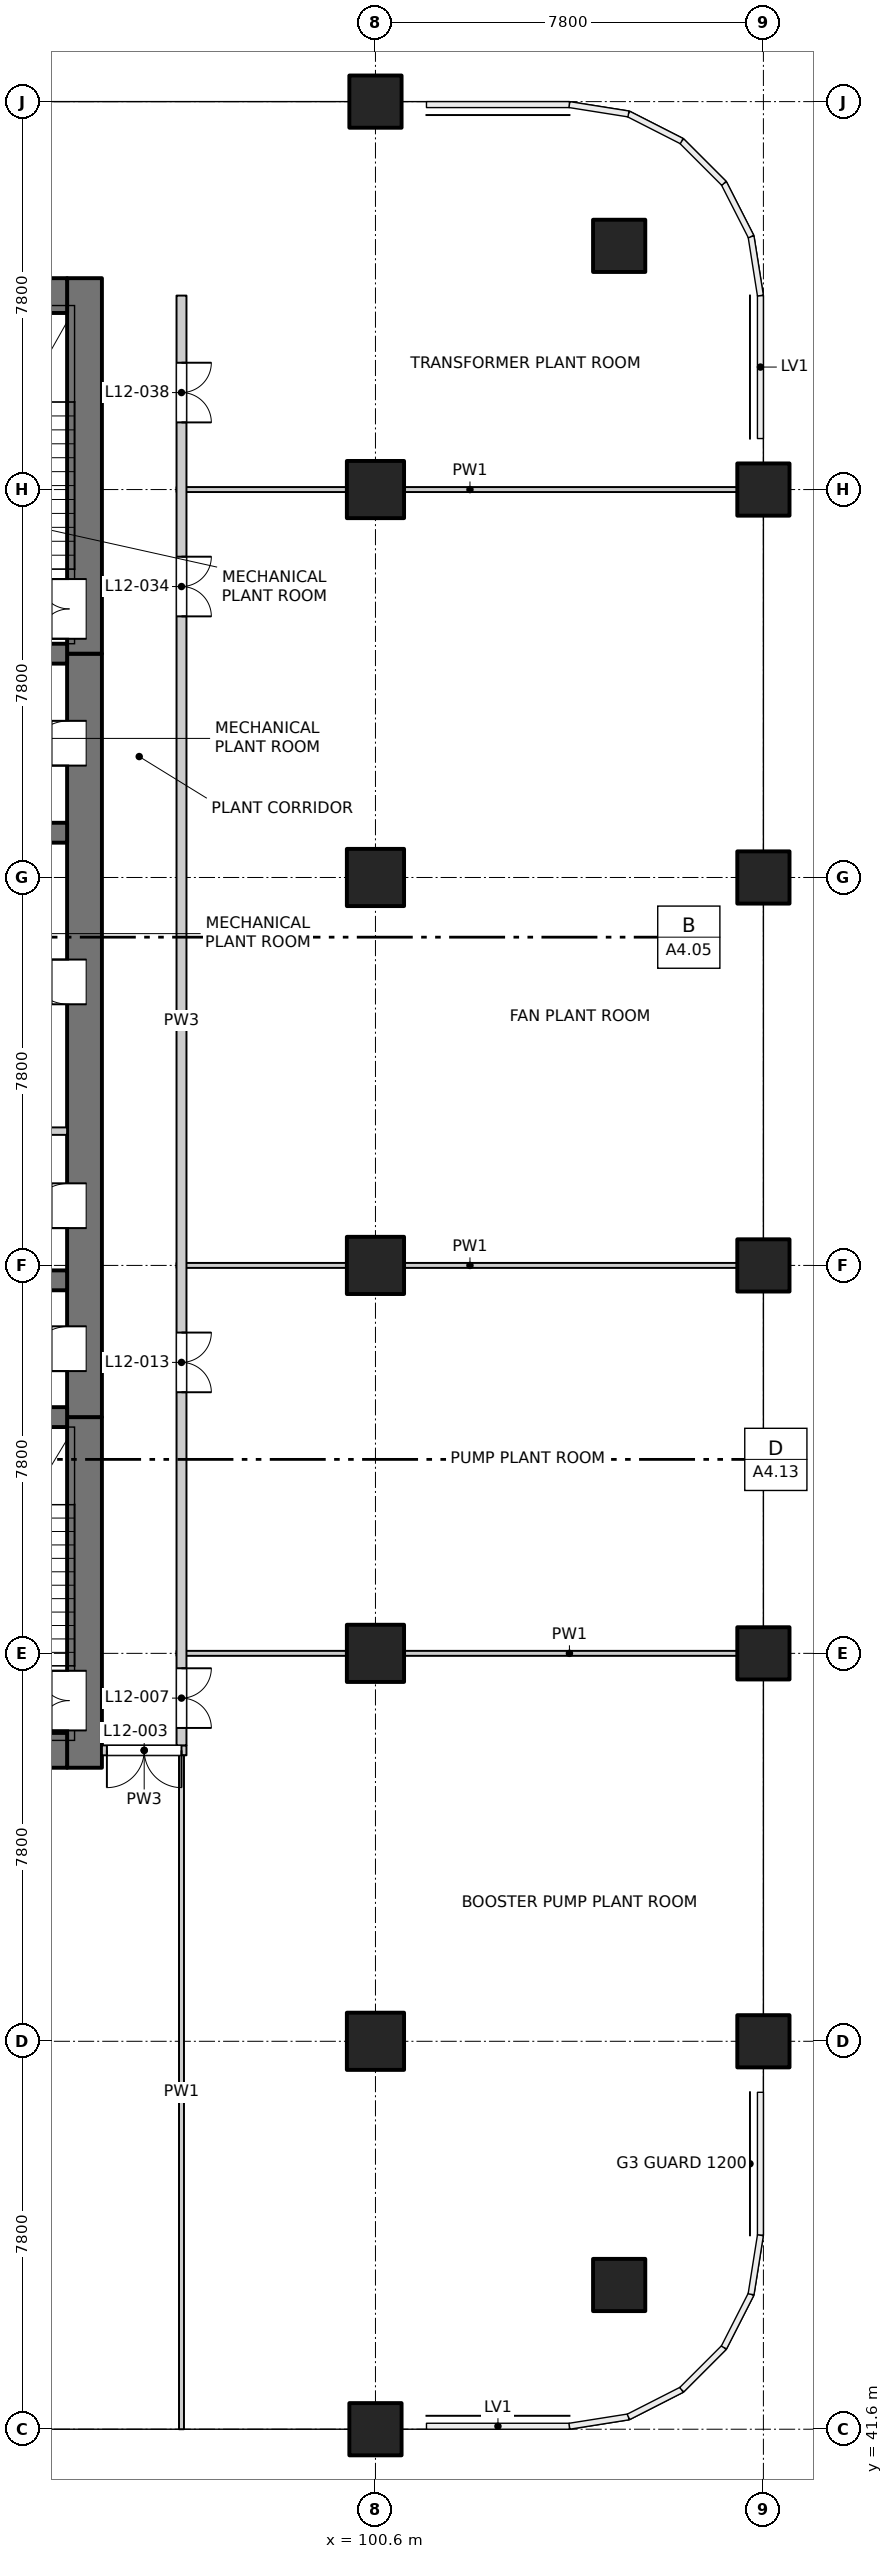
"""IFC4 building model, lengths in metres.
Left out: names, types, materials, properties, quantities, classifications, styles, units other than length and angle.
Written with IfcOpenShell. Run it as: python <this file> out.ifc"""

import sys

from ifc_helpers import new_model, si_unit, direction, frame, frame_2d, origin, origin_2d, place, context, subcontext, project, spatial, rectangle, extrude, element, fill, save


model = new_model("IFC4")
c1 = context("Model", 3, precision=1e-05, world=origin(), true_north=direction((0.0, 1.0)))
c2 = subcontext(c1, "Body", "Model", "MODEL_VIEW")
j1 = project(units=[si_unit("LENGTHUNIT", "METRE"), si_unit("PLANEANGLEUNIT", "RADIAN")], contexts=[c1])
p1 = place(None, origin())
s1 = spatial("IfcSite", under=j1, at=p1, CompositionType="ELEMENT")
p2 = place(p1, origin())
s2 = spatial("IfcBuilding", under=s1, at=p2, CompositionType="ELEMENT")
p3 = place(p2, frame((0.0, 0.0, 46.7)))
s3 = spatial("IfcBuildingStorey", under=s2, at=p3, CompositionType="ELEMENT", Elevation=46.7)
for number, where, z_axis, x_axis in (
    (1, (105.5, 44.5, -0.3), (0.0, 0.0, 1.0), (1.0, 0.0, 0.0)),
    (2, (105.5, 85.5, -0.3), (0.0, 0.0, 1.0), (1.0, 0.0, 0.0)),
    (3, (108.4, 49.4, -0.3), (0.0, 0.0, 1.0), (1.0, 0.0, 0.0)),
    (4, (108.4, 57.2, -0.3), (0.0, 0.0, 1.0), (1.0, 0.0, 0.0)),
    (5, (108.4, 65.0, -0.3), (0.0, 0.0, 1.0), (1.0, 0.0, 0.0)),
    (6, (108.4, 72.8, -0.3), (0.0, 0.0, 1.0), (1.0, 0.0, 0.0)),
    (7, (108.4, 80.6, -0.3), (0.0, 0.0, 1.0), (1.0, 0.0, 0.0)),
    (8, (100.6, 41.6, -0.3), (0.0, 0.0, 1.0), (1.0, 0.0, 0.0)),
    (9, (100.6, 88.4, -0.3), (0.0, 0.0, 1.0), (1.0, 0.0, 0.0)),
):
    element("IfcColumn", number, at=place(p3, frame(where, z_axis=z_axis, x_axis=x_axis)), inside=s3, PredefinedType="COLUMN", context=c2, shape_type="SweptSolid", body=[
        extrude(rectangle(XDim=1.05, YDim=1.05, at=origin_2d()), origin(), (0.0, 0.0, 1.0), 4.5),
    ])
for number, where, z_axis, x_axis in (
    (10, (100.6, 49.4, -0.3), (0.0, 0.0, 1.0), (1.0, 0.0, 0.0)),
    (11, (100.6, 57.2, -0.3), (0.0, 0.0, 1.0), (1.0, 0.0, 0.0)),
    (12, (100.6, 65.0, -0.3), (0.0, 0.0, 1.0), (1.0, 0.0, 0.0)),
    (13, (100.6, 72.8, -0.3), (0.0, 0.0, 1.0), (1.0, 0.0, 0.0)),
    (14, (100.6, 80.6, -0.3), (0.0, 0.0, 1.0), (1.0, 0.0, 0.0)),
):
    element("IfcColumn", number, at=place(p3, frame(where, z_axis=z_axis, x_axis=x_axis)), inside=s3, PredefinedType="COLUMN", context=c2, shape_type="SweptSolid", body=[
        extrude(rectangle(XDim=1.15, YDim=1.15, at=origin_2d()), origin(), (0.0, 0.0, 1.0), 4.5),
    ])
p4 = place(p3, frame((94.75, 54.9, -0.3), z_axis=(0.0, 0.0, 1.0), x_axis=(0.0, 1.0, 0.0)))
e15 = element("IfcWall", 15, at=p4, inside=s3, PredefinedType="SOLIDWALL", context=c2, shape_type="SweptSolid", body=[
    extrude(rectangle(XDim=7.05, YDim=0.7, at=frame_2d((3.525, 0.0))), origin(), (0.0, 0.0, 1.0), 4.5),
])
p5 = place(p4, frame((0.75, 0.0, 0.3)))
e16 = element("IfcOpeningElement", 16, at=p5, cuts=e15, PredefinedType="OPENING", context=c2, shape_type="SweptSolid", body=[
    extrude(rectangle(XDim=1.2, YDim=2.1, at=frame_2d((0.6, 1.05))), frame((0.0, 0.36, 0.0), z_axis=(0.0, -1.0, 0.0), x_axis=(1.0, 0.0, 0.0)), (0.0, 0.0, 1.0), 0.72),
])
p6 = place(p3, frame((94.75, 61.95, -0.3), z_axis=(0.0, 0.0, 1.0), x_axis=(0.0, 1.0, 0.0)))
e17 = element("IfcWall", 17, at=p6, inside=s3, PredefinedType="SOLIDWALL", context=c2, shape_type="SweptSolid", body=[
    extrude(rectangle(XDim=15.35, YDim=0.7, at=frame_2d((7.675, 0.0))), origin(), (0.0, 0.0, 1.0), 4.5),
])
p7 = place(p6, frame((0.925, 0.0, 0.3)))
e18 = element("IfcOpeningElement", 18, at=p7, cuts=e17, PredefinedType="OPENING", context=c2, shape_type="SweptSolid", body=[
    extrude(rectangle(XDim=0.9, YDim=2.1, at=frame_2d((0.45, 1.05))), frame((0.0, 0.36, 0.0), z_axis=(0.0, -1.0, 0.0), x_axis=(1.0, 0.0, 0.0)), (0.0, 0.0, 1.0), 0.72),
])
p8 = place(p6, frame((3.8, 0.0, 0.3)))
e19 = element("IfcOpeningElement", 19, at=p8, cuts=e17, PredefinedType="OPENING", context=c2, shape_type="SweptSolid", body=[
    extrude(rectangle(XDim=0.9, YDim=2.1, at=frame_2d((0.45, 1.05))), frame((0.0, 0.36, 0.0), z_axis=(0.0, -1.0, 0.0), x_axis=(1.0, 0.0, 0.0)), (0.0, 0.0, 1.0), 0.72),
])
p9 = place(p6, frame((8.3, 0.0, 0.3)))
e20 = element("IfcOpeningElement", 20, at=p9, cuts=e17, PredefinedType="OPENING", context=c2, shape_type="SweptSolid", body=[
    extrude(rectangle(XDim=0.9, YDim=2.1, at=frame_2d((0.45, 1.05))), frame((0.0, 0.36, 0.0), z_axis=(0.0, -1.0, 0.0), x_axis=(1.0, 0.0, 0.0)), (0.0, 0.0, 1.0), 0.72),
])
p10 = place(p6, frame((13.1, 0.0, 0.3)))
e21 = element("IfcOpeningElement", 21, at=p10, cuts=e17, PredefinedType="OPENING", context=c2, shape_type="SweptSolid", body=[
    extrude(rectangle(XDim=0.9, YDim=2.1, at=frame_2d((0.45, 1.05))), frame((0.0, 0.36, 0.0), z_axis=(0.0, -1.0, 0.0), x_axis=(1.0, 0.0, 0.0)), (0.0, 0.0, 1.0), 0.72),
])
p11 = place(p3, frame((94.75, 77.3, -0.3), z_axis=(0.0, 0.0, 1.0), x_axis=(0.0, 1.0, 0.0)))
e22 = element("IfcWall", 22, at=p11, inside=s3, PredefinedType="SOLIDWALL", context=c2, shape_type="SweptSolid", body=[
    extrude(rectangle(XDim=7.55, YDim=0.7, at=frame_2d((3.775, 0.0))), origin(), (0.0, 0.0, 1.0), 4.5),
])
p12 = place(p11, frame((0.3, 0.0, 0.3)))
e23 = element("IfcOpeningElement", 23, at=p12, cuts=e22, PredefinedType="OPENING", context=c2, shape_type="SweptSolid", body=[
    extrude(rectangle(XDim=1.2, YDim=2.1, at=frame_2d((0.6, 1.05))), frame((0.0, 0.36, 0.0), z_axis=(0.0, -1.0, 0.0), x_axis=(1.0, 0.0, 0.0)), (0.0, 0.0, 1.0), 0.72),
])
p13 = place(p3, frame((75.6, 55.25, -0.3), z_axis=(0.0, 0.0, 1.0), x_axis=(1.0, 0.0, 0.0)))
e24 = element("IfcWall", 24, at=p13, inside=s3, PredefinedType="SOLIDWALL", context=c2, shape_type="SweptSolid", body=[
    extrude(rectangle(XDim=18.8, YDim=0.7, at=frame_2d((9.4, 0.0))), origin(), (0.0, 0.0, 1.0), 4.5),
])
p14 = place(p13, frame((7.15, 0.0, 0.3)))
e25 = element("IfcOpeningElement", 25, at=p14, cuts=e24, PredefinedType="OPENING", context=c2, shape_type="SweptSolid", body=[
    extrude(rectangle(XDim=1.5, YDim=2.1, at=frame_2d((0.75, 1.05))), frame((0.0, 0.36, 0.0), z_axis=(0.0, -1.0, 0.0), x_axis=(1.0, 0.0, 0.0)), (0.0, 0.0, 1.0), 0.72),
])
p15 = place(p3, frame((75.6, 84.5, -0.3), z_axis=(0.0, 0.0, 1.0), x_axis=(1.0, 0.0, 0.0)))
e26 = element("IfcWall", 26, at=p15, inside=s3, PredefinedType="SOLIDWALL", context=c2, shape_type="SweptSolid", body=[
    extrude(rectangle(XDim=18.8, YDim=0.7, at=frame_2d((9.4, 0.0))), origin(), (0.0, 0.0, 1.0), 4.5),
])
for number, where, z_axis, x_axis in (
    (27, (90.75, 61.95, -0.3), (0.0, 0.0, 1.0), (1.0, 0.0, 0.0)),
    (28, (90.75, 64.7, -0.3), (0.0, 0.0, 1.0), (1.0, 0.0, 0.0)),
    (29, (90.75, 73.7, -0.3), (0.0, 0.0, 1.0), (1.0, 0.0, 0.0)),
    (30, (90.75, 77.3, -0.3), (0.0, 0.0, 1.0), (1.0, 0.0, 0.0)),
):
    element("IfcWall", number, at=place(p3, frame(where, z_axis=z_axis, x_axis=x_axis)), inside=s3, PredefinedType="SOLIDWALL", context=c2, shape_type="SweptSolid", body=[
        extrude(rectangle(XDim=3.65, YDim=0.4, at=frame_2d((1.825, 0.0))), origin(), (0.0, 0.0, 1.0), 4.5),
    ])
p16 = place(p3, frame((95.1, 55.25, 0.0), z_axis=(0.0, 0.0, 1.0), x_axis=(1.0, 0.0, 0.0)))
e31 = element("IfcWall", 31, at=p16, inside=s3, PredefinedType="PARTITIONING", context=c2, shape_type="SweptSolid", body=[
    extrude(rectangle(XDim=1.7, YDim=0.2, at=frame_2d((0.85, 0.0))), origin(), (0.0, 0.0, 1.0), 4.2),
])
p17 = place(p16, frame((0.1, 0.0, 0.0)))
e32 = element("IfcOpeningElement", 32, at=p17, cuts=e31, PredefinedType="OPENING", context=c2, shape_type="SweptSolid", body=[
    extrude(rectangle(XDim=1.5, YDim=2.1, at=frame_2d((0.75, 1.05))), frame((0.0, 0.11, 0.0), z_axis=(0.0, -1.0, 0.0), x_axis=(1.0, 0.0, 0.0)), (0.0, 0.0, 1.0), 0.22),
])
p18 = place(p3, frame((96.6, 57.2, 0.0), z_axis=(0.0, 0.0, 1.0), x_axis=(1.0, 0.0, 0.0)))
e33 = element("IfcWall", 33, at=p18, inside=s3, PredefinedType="PARTITIONING", context=c2, shape_type="SweptSolid", body=[
    extrude(rectangle(XDim=4.0, YDim=0.1, at=frame_2d((2.0, 0.0))), origin(), (0.0, 0.0, 1.0), 4.2),
])
p19 = place(p3, frame((100.6, 57.2, 0.0), z_axis=(0.0, 0.0, 1.0), x_axis=(1.0, 0.0, 0.0)))
e34 = element("IfcWall", 34, at=p19, inside=s3, PredefinedType="PARTITIONING", context=c2, shape_type="SweptSolid", body=[
    extrude(rectangle(XDim=7.8, YDim=0.1, at=frame_2d((3.9, 0.0))), origin(), (0.0, 0.0, 1.0), 3.6),
])
p20 = place(p3, frame((96.6, 65.0, 0.0), z_axis=(0.0, 0.0, 1.0), x_axis=(1.0, 0.0, 0.0)))
e35 = element("IfcWall", 35, at=p20, inside=s3, PredefinedType="PARTITIONING", context=c2, shape_type="SweptSolid", body=[
    extrude(rectangle(XDim=11.8, YDim=0.1, at=frame_2d((5.9, 0.0))), origin(), (0.0, 0.0, 1.0), 4.2),
])
p21 = place(p3, frame((90.75, 67.7, 0.0), z_axis=(0.0, 0.0, 1.0), x_axis=(1.0, 0.0, 0.0)))
e36 = element("IfcWall", 36, at=p21, inside=s3, PredefinedType="PARTITIONING", context=c2, shape_type="SweptSolid", body=[
    extrude(rectangle(XDim=3.65, YDim=0.15, at=frame_2d((1.825, 0.0))), origin(), (0.0, 0.0, 1.0), 4.2),
])
p22 = place(p3, frame((96.6, 80.6, 0.0), z_axis=(0.0, 0.0, 1.0), x_axis=(1.0, 0.0, 0.0)))
e37 = element("IfcWall", 37, at=p22, inside=s3, PredefinedType="PARTITIONING", context=c2, shape_type="SweptSolid", body=[
    extrude(rectangle(XDim=11.8, YDim=0.1, at=frame_2d((5.9, 0.0))), origin(), (0.0, 0.0, 1.0), 4.2),
])
p23 = place(p3, frame((96.7, 41.6, 0.0), z_axis=(0.0, 0.0, 1.0), x_axis=(0.0, 1.0, 0.0)))
e38 = element("IfcWall", 38, at=p23, inside=s3, PredefinedType="PARTITIONING", context=c2, shape_type="SweptSolid", body=[
    extrude(rectangle(XDim=13.55, YDim=0.1, at=frame_2d((6.775, 0.0))), origin(), (0.0, 0.0, 1.0), 4.2),
])
p24 = place(p3, frame((96.7, 55.35, 0.0), z_axis=(0.0, 0.0, 1.0), x_axis=(0.0, 1.0, 0.0)))
e39 = element("IfcWall", 39, at=p24, inside=s3, PredefinedType="PARTITIONING", context=c2, shape_type="SweptSolid", body=[
    extrude(rectangle(XDim=29.15, YDim=0.2, at=frame_2d((14.575, 0.0))), origin(), (0.0, 0.0, 1.0), 4.2),
])
p25 = place(p24, frame((0.35, 0.0, 0.0)))
e40 = element("IfcOpeningElement", 40, at=p25, cuts=e39, PredefinedType="OPENING", context=c2, shape_type="SweptSolid", body=[
    extrude(rectangle(XDim=1.2, YDim=2.1, at=frame_2d((0.6, 1.05))), frame((0.0, 0.11, 0.0), z_axis=(0.0, -1.0, 0.0), x_axis=(1.0, 0.0, 0.0)), (0.0, 0.0, 1.0), 0.22),
])
p26 = place(p24, frame((7.1, 0.0, 0.0)))
e41 = element("IfcOpeningElement", 41, at=p26, cuts=e39, PredefinedType="OPENING", context=c2, shape_type="SweptSolid", body=[
    extrude(rectangle(XDim=1.2, YDim=2.1, at=frame_2d((0.6, 1.05))), frame((0.0, 0.11, 0.0), z_axis=(0.0, -1.0, 0.0), x_axis=(1.0, 0.0, 0.0)), (0.0, 0.0, 1.0), 0.22),
])
p27 = place(p24, frame((22.7, 0.0, 0.0)))
e42 = element("IfcOpeningElement", 42, at=p27, cuts=e39, PredefinedType="OPENING", context=c2, shape_type="SweptSolid", body=[
    extrude(rectangle(XDim=1.2, YDim=2.1, at=frame_2d((0.6, 1.05))), frame((0.0, 0.11, 0.0), z_axis=(0.0, -1.0, 0.0), x_axis=(1.0, 0.0, 0.0)), (0.0, 0.0, 1.0), 0.22),
])
p28 = place(p24, frame((26.6, 0.0, 0.0)))
e43 = element("IfcOpeningElement", 43, at=p28, cuts=e39, PredefinedType="OPENING", context=c2, shape_type="SweptSolid", body=[
    extrude(rectangle(XDim=1.2, YDim=2.1, at=frame_2d((0.6, 1.05))), frame((0.0, 0.11, 0.0), z_axis=(0.0, -1.0, 0.0), x_axis=(1.0, 0.0, 0.0)), (0.0, 0.0, 1.0), 0.22),
])
p29 = place(p17, origin())
e44 = element("IfcDoor", 44, at=p29, inside=s3, OperationType="DOUBLE_DOOR_SINGLE_SWING", PredefinedType="DOOR", context=c2, shape_type="SweptSolid", body=[
    extrude(rectangle(XDim=1.5, YDim=2.1, at=frame_2d((0.75, 1.05))), frame((0.0, 0.025, 0.0), z_axis=(0.0, -1.0, 0.0), x_axis=(1.0, 0.0, 0.0)), (0.0, 0.0, 1.0), 0.05),
])
fill(e32, e44)
p30 = place(p5, origin())
e45 = element("IfcDoor", 45, at=p30, inside=s3, OperationType="DOUBLE_DOOR_SINGLE_SWING", PredefinedType="DOOR", context=c2, shape_type="SweptSolid", body=[
    extrude(rectangle(XDim=1.2, YDim=2.1, at=frame_2d((0.6, 1.05))), frame((0.0, 0.335, 0.0), z_axis=(0.0, -1.0, 0.0), x_axis=(1.0, 0.0, 0.0)), (0.0, 0.0, 1.0), 0.05),
])
fill(e16, e45)
p31 = place(p25, origin())
e46 = element("IfcDoor", 46, at=p31, inside=s3, OperationType="DOUBLE_DOOR_SINGLE_SWING", PredefinedType="DOOR", context=c2, shape_type="SweptSolid", body=[
    extrude(rectangle(XDim=1.2, YDim=2.1, at=frame_2d((0.6, 1.05))), frame((0.0, 0.025, 0.0), z_axis=(0.0, -1.0, 0.0), x_axis=(1.0, 0.0, 0.0)), (0.0, 0.0, 1.0), 0.05),
])
fill(e40, e46)
p32 = place(p26, origin())
e47 = element("IfcDoor", 47, at=p32, inside=s3, OperationType="DOUBLE_DOOR_SINGLE_SWING", PredefinedType="DOOR", context=c2, shape_type="SweptSolid", body=[
    extrude(rectangle(XDim=1.2, YDim=2.1, at=frame_2d((0.6, 1.05))), frame((0.0, 0.025, 0.0), z_axis=(0.0, -1.0, 0.0), x_axis=(1.0, 0.0, 0.0)), (0.0, 0.0, 1.0), 0.05),
])
fill(e41, e47)
p33 = place(p7, origin())
e48 = element("IfcDoor", 48, at=p33, inside=s3, OperationType="SINGLE_SWING_LEFT", PredefinedType="DOOR", context=c2, shape_type="SweptSolid", body=[
    extrude(rectangle(XDim=0.9, YDim=2.1, at=frame_2d((0.45, 1.05))), frame((0.0, 0.335, 0.0), z_axis=(0.0, -1.0, 0.0), x_axis=(1.0, 0.0, 0.0)), (0.0, 0.0, 1.0), 0.05),
])
fill(e18, e48)
p34 = place(p8, origin())
e49 = element("IfcDoor", 49, at=p34, inside=s3, OperationType="SINGLE_SWING_LEFT", PredefinedType="DOOR", context=c2, shape_type="SweptSolid", body=[
    extrude(rectangle(XDim=0.9, YDim=2.1, at=frame_2d((0.45, 1.05))), frame((0.0, 0.335, 0.0), z_axis=(0.0, -1.0, 0.0), x_axis=(1.0, 0.0, 0.0)), (0.0, 0.0, 1.0), 0.05),
])
fill(e19, e49)
p35 = place(p9, origin())
e50 = element("IfcDoor", 50, at=p35, inside=s3, OperationType="SINGLE_SWING_RIGHT", PredefinedType="DOOR", context=c2, shape_type="SweptSolid", body=[
    extrude(rectangle(XDim=0.9, YDim=2.1, at=frame_2d((0.45, 1.05))), frame((0.0, 0.335, 0.0), z_axis=(0.0, -1.0, 0.0), x_axis=(1.0, 0.0, 0.0)), (0.0, 0.0, 1.0), 0.05),
])
fill(e20, e50)
p36 = place(p10, origin())
e51 = element("IfcDoor", 51, at=p36, inside=s3, OperationType="SINGLE_SWING_LEFT", PredefinedType="DOOR", context=c2, shape_type="SweptSolid", body=[
    extrude(rectangle(XDim=0.9, YDim=2.1, at=frame_2d((0.45, 1.05))), frame((0.0, 0.335, 0.0), z_axis=(0.0, -1.0, 0.0), x_axis=(1.0, 0.0, 0.0)), (0.0, 0.0, 1.0), 0.05),
])
fill(e21, e51)
p37 = place(p12, origin())
e52 = element("IfcDoor", 52, at=p37, inside=s3, OperationType="DOUBLE_DOOR_SINGLE_SWING", PredefinedType="DOOR", context=c2, shape_type="SweptSolid", body=[
    extrude(rectangle(XDim=1.2, YDim=2.1, at=frame_2d((0.6, 1.05))), frame((0.0, 0.335, 0.0), z_axis=(0.0, -1.0, 0.0), x_axis=(1.0, 0.0, 0.0)), (0.0, 0.0, 1.0), 0.05),
])
fill(e23, e52)
p38 = place(p27, origin())
e53 = element("IfcDoor", 53, at=p38, inside=s3, OperationType="DOUBLE_DOOR_SINGLE_SWING", PredefinedType="DOOR", context=c2, shape_type="SweptSolid", body=[
    extrude(rectangle(XDim=1.2, YDim=2.1, at=frame_2d((0.6, 1.05))), frame((0.0, 0.025, 0.0), z_axis=(0.0, -1.0, 0.0), x_axis=(1.0, 0.0, 0.0)), (0.0, 0.0, 1.0), 0.05),
])
fill(e42, e53)
p39 = place(p28, origin())
e54 = element("IfcDoor", 54, at=p39, inside=s3, OperationType="DOUBLE_DOOR_SINGLE_SWING", PredefinedType="DOOR", context=c2, shape_type="SweptSolid", body=[
    extrude(rectangle(XDim=1.2, YDim=2.1, at=frame_2d((0.6, 1.05))), frame((0.0, 0.025, 0.0), z_axis=(0.0, -1.0, 0.0), x_axis=(1.0, 0.0, 0.0)), (0.0, 0.0, 1.0), 0.05),
])
fill(e43, e54)
save(model, sys.argv[1])
